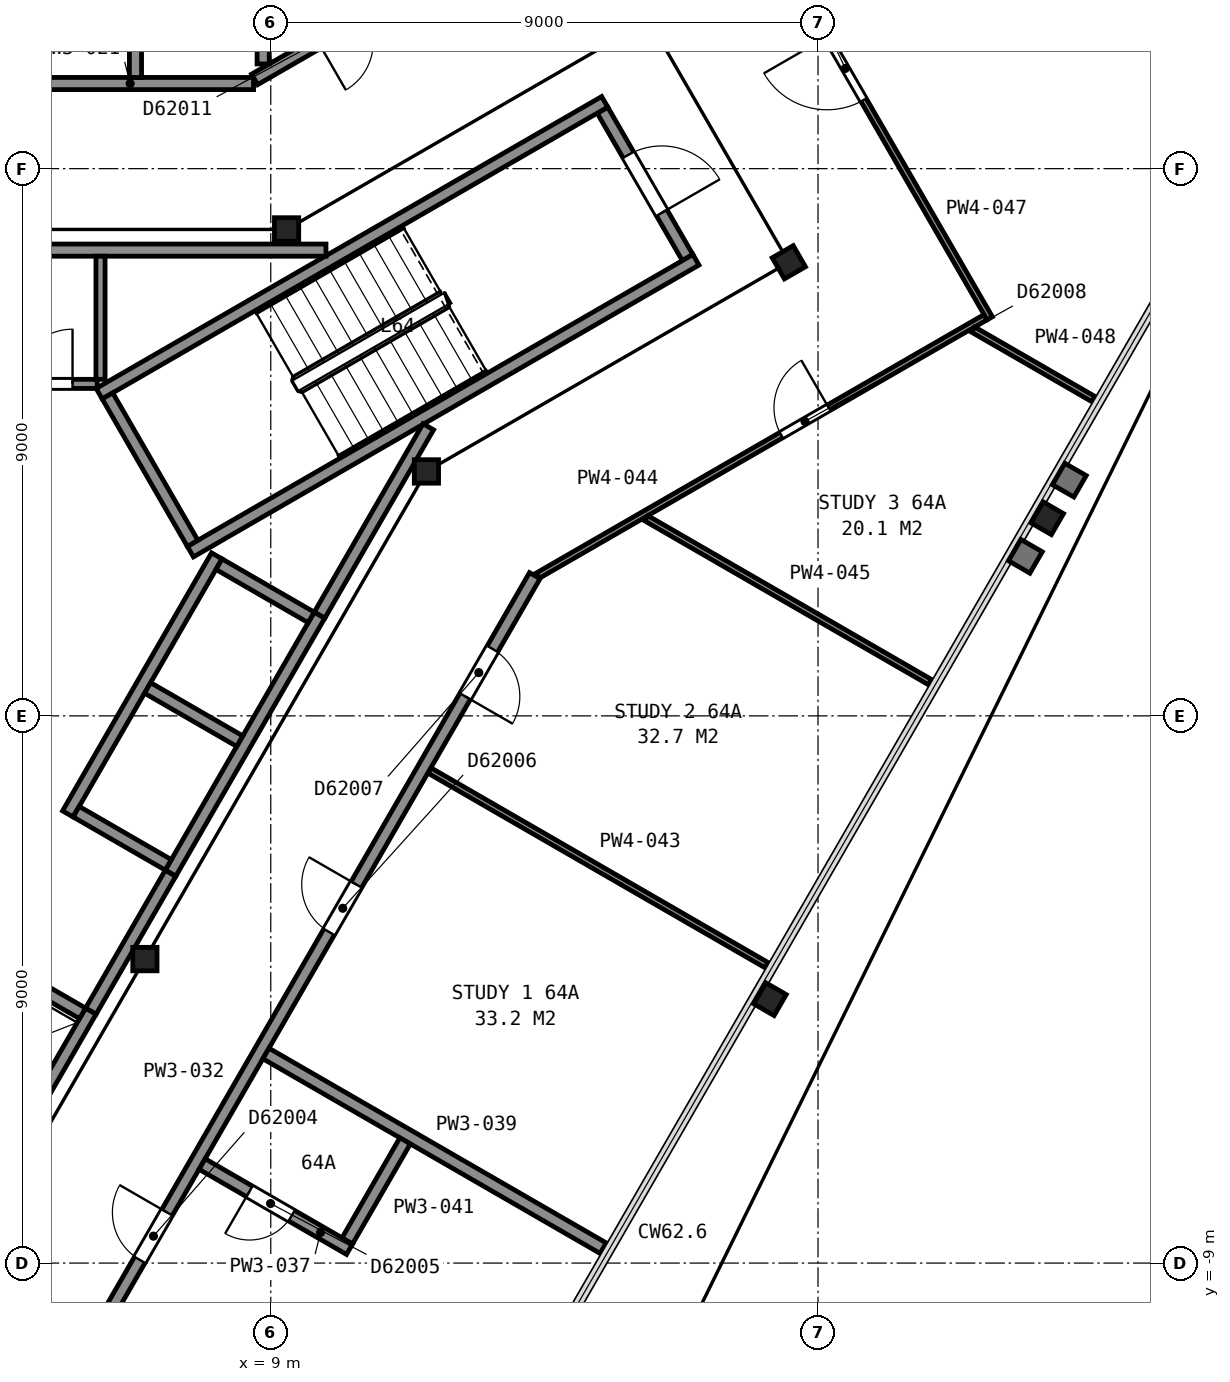
"""IFC4 building model, lengths in metres.
Left out: names, types, materials, properties, quantities, classifications, styles, units other than length and angle.
Written with IfcOpenShell. Run it as: python <this file> out.ifc"""

import sys

from ifc_helpers import new_model, si_unit, direction, frame, frame_2d, origin, origin_2d, place, context, subcontext, project, spatial, rectangle, i_section, extrude, element, fill, save


model = new_model("IFC4")
c1 = context("Model", 3, precision=1e-05, world=origin(), true_north=direction((0.0, 1.0)))
c2 = subcontext(c1, "Body", "Model", "MODEL_VIEW")
j1 = project(units=[si_unit("LENGTHUNIT", "METRE"), si_unit("PLANEANGLEUNIT", "RADIAN")], contexts=[c1])
p1 = place(None, origin())
s1 = spatial("IfcSite", under=j1, at=p1, CompositionType="ELEMENT")
p2 = place(p1, origin())
s2 = spatial("IfcBuilding", under=s1, at=p2, CompositionType="ELEMENT")
p3 = place(p2, frame((0.0, 0.0, 254.5)))
s3 = spatial("IfcBuildingStorey", under=s2, at=p3, CompositionType="ELEMENT", Elevation=254.5)
for number, where, z_axis, x_axis in (
    (1, (17.21, -4.66, 0.0), (0.0, 0.0, 1.0), (-0.5, -0.866, 0.0)),
    (2, (21.77, 3.25, 0.0), (0.0, 0.0, 1.0), (-0.5, -0.866, 0.0)),
):
    element("IfcColumn", number, at=place(p3, frame(where, z_axis=z_axis, x_axis=x_axis)), inside=s3, PredefinedType="COLUMN", context=c2, shape_type="SweptSolid", body=[
        extrude(i_section(OverallWidth=0.399, OverallDepth=0.386, WebThickness=0.021, FlangeThickness=0.033, FilletRadius=0.015, at=origin_2d()), origin(), (0.0, 0.0, 1.0), 3.01),
    ])
p4 = place(p3, frame((11.56, 4.02, 0.0), z_axis=(0.0, 0.0, 1.0), x_axis=(1.0, 0.0, 0.0)))
e3 = element("IfcColumn", 3, at=p4, inside=s3, PredefinedType="COLUMN", context=c2, shape_type="SweptSolid", body=[
    extrude(i_section(OverallWidth=0.399, OverallDepth=0.386, WebThickness=0.021, FlangeThickness=0.033, FilletRadius=0.015, at=origin_2d()), origin(), (0.0, 0.0, 1.0), 3.635),
])
p5 = place(p3, frame((17.52, 7.46, 0.0), z_axis=(0.0, 0.0, 1.0), x_axis=(0.5, -0.866025403784, 0.0)))
e4 = element("IfcColumn", 4, at=p5, inside=s3, PredefinedType="COLUMN", context=c2, shape_type="SweptSolid", body=[
    extrude(i_section(OverallWidth=0.401, OverallDepth=0.399, WebThickness=0.025, FlangeThickness=0.04, FilletRadius=0.015, at=origin_2d()), origin(), (0.0, 0.0, 1.0), 3.65),
])
p6 = place(p3, frame((9.26, 8.0, 0.0), z_axis=(0.0, 0.0, 1.0), x_axis=(1.0, 0.0, 0.0)))
e5 = element("IfcColumn", 5, at=p6, inside=s3, PredefinedType="COLUMN", context=c2, shape_type="SweptSolid", body=[
    extrude(i_section(OverallWidth=0.399, OverallDepth=0.386, WebThickness=0.021, FlangeThickness=0.033, FilletRadius=0.015, at=origin_2d()), origin(), (0.0, 0.0, 1.0), 3.635),
])
p7 = place(p3, frame((6.93, -4.0, 0.0), z_axis=(0.0, 0.0, 1.0), x_axis=(1.0, 0.0, 0.0)))
e6 = element("IfcColumn", 6, at=p7, inside=s3, PredefinedType="COLUMN", context=c2, shape_type="SweptSolid", body=[
    extrude(i_section(OverallWidth=0.399, OverallDepth=0.386, WebThickness=0.021, FlangeThickness=0.033, FilletRadius=0.015, at=origin_2d()), origin(), (0.0, 0.0, 1.0), 3.66),
])
p8 = place(p3, frame((15.855, 7.538, 0.0), z_axis=(0.0, 0.0, 1.0), x_axis=(-0.500049511043, 0.865996816683, 0.0)))
e7 = element("IfcWall", 7, at=p8, inside=s3, PredefinedType="PARTITIONING", context=c2, shape_type="SweptSolid", body=[
    extrude(rectangle(XDim=2.8, YDim=0.2, at=frame_2d((1.4, 0.0))), origin(), (0.0, 0.0, 1.0), 3.45),
])
p9 = place(p8, frame((0.85, 0.0, 0.0)))
e8 = element("IfcOpeningElement", 8, at=p9, cuts=e7, PredefinedType="OPENING", context=c2, shape_type="SweptSolid", body=[
    extrude(rectangle(XDim=1.1, YDim=2.1, at=frame_2d((0.55, 1.05))), frame((0.0, 0.11, 0.0), z_axis=(0.0, -1.0, 0.0), x_axis=(1.0, 0.0, 0.0)), (0.0, 0.0, 1.0), 0.22),
])
for number, where, z_axis, x_axis in (
    (9, (6.178, 5.299, 0.0), (0.0, 0.0, 1.0), (0.866, 0.5, 0.0)),
    (10, (7.678, 2.701, 0.0), (0.0, 0.0, 1.0), (0.866, 0.5, 0.0)),
):
    element("IfcWall", number, at=place(p3, frame(where, z_axis=z_axis, x_axis=x_axis)), inside=s3, PredefinedType="PARTITIONING", context=c2, shape_type="SweptSolid", body=[
        extrude(rectangle(XDim=9.6, YDim=0.2, at=frame_2d((4.8, 0.0))), origin(), (0.0, 0.0, 1.0), 3.45),
    ])
p10 = place(p3, frame((7.715, 2.838, 0.0), z_axis=(0.0, 0.0, 1.0), x_axis=(-0.500049511043, 0.865996816683, 0.0)))
e11 = element("IfcWall", 11, at=p10, inside=s3, PredefinedType="PARTITIONING", context=c2, shape_type="SweptSolid", body=[
    extrude(rectangle(XDim=2.8, YDim=0.2, at=frame_2d((1.4, 0.0))), origin(), (0.0, 0.0, 1.0), 3.45),
])
p11 = place(p3, frame((4.766, -7.065, 0.0), z_axis=(0.0, 0.0, 1.0), x_axis=(0.499948979701, 0.866054858364, 0.0)))
e12 = element("IfcWall", 12, at=p11, inside=s3, PredefinedType="PARTITIONING", context=c2, shape_type="SweptSolid", body=[
    extrude(rectangle(XDim=2.55, YDim=0.2, at=frame_2d((1.275, 0.0))), origin(), (0.0, 0.0, 1.0), 3.7),
])
p12 = place(p3, frame((7.351, -2.587, 0.0), z_axis=(0.0, 0.0, 1.0), x_axis=(0.500002801628, 0.866023786258, 0.0)))
e13 = element("IfcWall", 13, at=p12, inside=s3, PredefinedType="PARTITIONING", context=c2, shape_type="SweptSolid", body=[
    extrude(rectangle(XDim=4.9, YDim=0.2, at=frame_2d((2.45, 0.0))), origin(), (0.0, 0.0, 1.0), 3.7),
])
p13 = place(p3, frame((5.663, -1.612, 0.0), z_axis=(0.0, 0.0, 1.0), x_axis=(0.49998122708, 0.866036242063, 0.0)))
e14 = element("IfcWall", 14, at=p13, inside=s3, PredefinedType="PARTITIONING", context=c2, shape_type="SweptSolid", body=[
    extrude(rectangle(XDim=4.9, YDim=0.2, at=frame_2d((2.45, 0.0))), origin(), (0.0, 0.0, 1.0), 3.7),
])
p14 = place(p3, frame((9.665, 1.62, 0.0), z_axis=(0.0, 0.0, 1.0), x_axis=(-0.866002029911, 0.500040482552, 0.0)))
e15 = element("IfcWall", 15, at=p14, inside=s3, PredefinedType="PARTITIONING", context=c2, shape_type="SweptSolid", body=[
    extrude(rectangle(XDim=1.75, YDim=0.2, at=frame_2d((0.875, 0.0))), origin(), (0.0, 0.0, 1.0), 3.7),
])
for number, where, z_axis, x_axis in (
    (16, (8.49, -0.416, 0.0), (0.0, 0.0, 1.0), (-0.866, 0.5, 0.0)),
    (17, (7.315, -2.451, 0.0), (0.0, 0.0, 1.0), (-0.866, 0.5, 0.0)),
):
    element("IfcWall", number, at=place(p3, frame(where, z_axis=z_axis, x_axis=x_axis)), inside=s3, PredefinedType="PARTITIONING", context=c2, shape_type="SweptSolid", body=[
        extrude(rectangle(XDim=1.75, YDim=0.2, at=frame_2d((0.875, 0.0))), origin(), (0.0, 0.0, 1.0), 3.7),
    ])
p15 = place(p3, frame((5.905, -4.893, 0.0), z_axis=(0.0, 0.0, 1.0), x_axis=(-0.866002029911, 0.500040482552, 0.0)))
e18 = element("IfcWall", 18, at=p15, inside=s3, PredefinedType="PARTITIONING", context=c2, shape_type="SweptSolid", body=[
    extrude(rectangle(XDim=1.75, YDim=0.2, at=frame_2d((0.875, 0.0))), origin(), (0.0, 0.0, 1.0), 3.7),
])
p16 = place(p3, frame((-3.933, 7.66, 0.0), z_axis=(0.0, 0.0, 1.0), x_axis=(1.0, 0.0, 0.0)))
e19 = element("IfcWall", 19, at=p16, inside=s3, PredefinedType="PARTITIONING", context=c2, shape_type="SweptSolid", body=[
    extrude(rectangle(XDim=13.841, YDim=0.2, at=frame_2d((6.92, 0.0))), origin(), (0.0, 0.0, 1.0), 3.45),
])
p17 = place(p3, frame((0.925, 5.46, 0.0), z_axis=(0.0, 0.0, 1.0), x_axis=(1.0, 0.0, 0.0)))
e20 = element("IfcWall", 20, at=p17, inside=s3, PredefinedType="PARTITIONING", context=c2, shape_type="SweptSolid", body=[
    extrude(rectangle(XDim=5.22, YDim=0.15, at=frame_2d((2.61, 0.0))), origin(), (0.0, 0.0, 1.0), 3.45),
])
p18 = place(p17, frame((3.915, 0.0, 0.0)))
e21 = element("IfcOpeningElement", 21, at=p18, cuts=e20, PredefinedType="OPENING", context=c2, shape_type="SweptSolid", body=[
    extrude(rectangle(XDim=0.9, YDim=2.1, at=frame_2d((0.45, 1.05))), frame((0.0, 0.085, 0.0), z_axis=(0.0, -1.0, 0.0), x_axis=(1.0, 0.0, 0.0)), (0.0, 0.0, 1.0), 0.17),
])
p19 = place(p3, frame((6.042, -4.855, 0.0), z_axis=(0.0, 0.0, 1.0), x_axis=(0.500252727967, 0.865879442048, 0.0)))
e22 = element("IfcWall", 22, at=p19, inside=s3, PredefinedType="PARTITIONING", context=c2, shape_type="SweptSolid", body=[
    extrude(rectangle(XDim=2.617, YDim=0.2, at=frame_2d((1.309, 0.0))), origin(), (0.0, 0.0, 1.0), 3.45),
])
p20 = place(p3, frame((6.2, 5.535, 0.0), z_axis=(0.0, 0.0, 1.0), x_axis=(0.0, 1.0, 0.0)))
e23 = element("IfcWall", 23, at=p20, inside=s3, PredefinedType="PARTITIONING", context=c2, shape_type="SweptSolid", body=[
    extrude(rectangle(XDim=2.025, YDim=0.15, at=frame_2d((1.013, 0.0))), origin(), (0.0, 0.0, 1.0), 3.45),
])
p21 = place(p3, frame((9.803, 1.658, 0.0), z_axis=(0.0, 0.0, 1.0), x_axis=(0.499943114462, 0.866058244174, 0.0)))
e24 = element("IfcWall", 24, at=p21, inside=s3, PredefinedType="PARTITIONING", context=c2, shape_type="SweptSolid", body=[
    extrude(rectangle(XDim=3.576, YDim=0.2, at=frame_2d((1.788, 0.0))), origin(), (0.0, 0.0, 1.0), 3.45),
])
p22 = place(p3, frame((-8.667, 10.4, 0.0), z_axis=(0.0, 0.0, 1.0), x_axis=(1.0, 0.0, 0.0)))
e25 = element("IfcWall", 25, at=p22, inside=s3, PredefinedType="PARTITIONING", context=c2, shape_type="SweptSolid", body=[
    extrude(rectangle(XDim=17.384, YDim=0.2, at=frame_2d((8.692, 0.0))), origin(), (0.0, 0.0, 1.0), 2.362),
])
p23 = place(p22, frame((12.425, 0.0, 0.0)))
e26 = element("IfcOpeningElement", 26, at=p23, cuts=e25, PredefinedType="OPENING", context=c2, shape_type="SweptSolid", body=[
    extrude(rectangle(XDim=0.9, YDim=2.1, at=frame_2d((0.45, 1.05))), frame((0.0, 0.11, 0.0), z_axis=(0.0, -1.0, 0.0), x_axis=(1.0, 0.0, 0.0)), (0.0, 0.0, 1.0), 0.22),
])
p24 = place(p22, frame((7.716, 0.0, 0.0)))
e27 = element("IfcOpeningElement", 27, at=p24, cuts=e25, PredefinedType="OPENING", context=c2, shape_type="SweptSolid", body=[
    extrude(rectangle(XDim=0.9, YDim=2.1, at=frame_2d((0.45, 1.05))), frame((0.0, 0.11, 0.0), z_axis=(0.0, -1.0, 0.0), x_axis=(1.0, 0.0, 0.0)), (0.0, 0.0, 1.0), 0.22),
])
p25 = place(p22, frame((3.358, 0.0, 0.0)))
e28 = element("IfcOpeningElement", 28, at=p25, cuts=e25, PredefinedType="OPENING", context=c2, shape_type="SweptSolid", body=[
    extrude(rectangle(XDim=0.9, YDim=2.1, at=frame_2d((0.45, 1.05))), frame((0.0, 0.11, 0.0), z_axis=(0.0, -1.0, 0.0), x_axis=(1.0, 0.0, 0.0)), (0.0, 0.0, 1.0), 0.22),
])
p26 = place(p3, frame((13.342, 2.306, 0.0), z_axis=(0.0, 0.0, 1.0), x_axis=(-0.499983003136, -0.866035216706, 0.0)))
e29 = element("IfcWall", 29, at=p26, inside=s3, PredefinedType="PARTITIONING", context=c2, shape_type="SweptSolid", body=[
    extrude(rectangle(XDim=17.385, YDim=0.2, at=frame_2d((8.692, 0.0))), origin(), (0.0, 0.0, 1.0), 2.362),
])
p27 = place(p26, frame((15.185, 0.0, 0.0)))
e30 = element("IfcOpeningElement", 30, at=p27, cuts=e29, PredefinedType="OPENING", context=c2, shape_type="SweptSolid", body=[
    extrude(rectangle(XDim=0.9, YDim=2.1, at=frame_2d((0.45, 1.05))), frame((0.0, 0.11, 0.0), z_axis=(0.0, -1.0, 0.0), x_axis=(1.0, 0.0, 0.0)), (0.0, 0.0, 1.0), 0.22),
])
p28 = place(p26, frame((12.094, 0.0, 0.0)))
e31 = element("IfcOpeningElement", 31, at=p28, cuts=e29, PredefinedType="OPENING", context=c2, shape_type="SweptSolid", body=[
    extrude(rectangle(XDim=0.9, YDim=2.1, at=frame_2d((0.45, 1.05))), frame((0.0, 0.11, 0.0), z_axis=(0.0, -1.0, 0.0), x_axis=(1.0, 0.0, 0.0)), (0.0, 0.0, 1.0), 0.22),
])
p29 = place(p26, frame((5.867, 0.0, 0.0)))
e32 = element("IfcOpeningElement", 32, at=p29, cuts=e29, PredefinedType="OPENING", context=c2, shape_type="SweptSolid", body=[
    extrude(rectangle(XDim=0.9, YDim=2.1, at=frame_2d((0.45, 1.05))), frame((0.0, 0.11, 0.0), z_axis=(0.0, -1.0, 0.0), x_axis=(1.0, 0.0, 0.0)), (0.0, 0.0, 1.0), 0.22),
])
p30 = place(p26, frame((1.392, 0.0, 0.0)))
e33 = element("IfcOpeningElement", 33, at=p30, cuts=e29, PredefinedType="OPENING", context=c2, shape_type="SweptSolid", body=[
    extrude(rectangle(XDim=0.9, YDim=2.1, at=frame_2d((0.45, 1.05))), frame((0.0, 0.11, 0.0), z_axis=(0.0, -1.0, 0.0), x_axis=(1.0, 0.0, 0.0)), (0.0, 0.0, 1.0), 0.22),
])
p31 = place(p3, frame((6.775, 10.5, 0.0), z_axis=(0.0, 0.0, 1.0), x_axis=(0.0, 1.0, 0.0)))
e34 = element("IfcWall", 34, at=p31, inside=s3, PredefinedType="PARTITIONING", context=c2, shape_type="SweptSolid", body=[
    extrude(rectangle(XDim=6.406, YDim=0.2, at=frame_2d((3.203, 0.0))), origin(), (0.0, 0.0, 1.0), 2.362),
])
p32 = place(p3, frame((7.871, -7.371, 0.0), z_axis=(0.0, 0.0, 1.0), x_axis=(0.866056369097, -0.49994636267, 0.0)))
e35 = element("IfcWall", 35, at=p32, inside=s3, PredefinedType="PARTITIONING", context=c2, shape_type="SweptSolid", body=[
    extrude(rectangle(XDim=2.8, YDim=0.2, at=frame_2d((1.4, 0.0))), origin(), (0.0, 0.0, 1.0), 2.362),
])
p33 = place(p32, frame((0.9, 0.0, 0.0)))
e36 = element("IfcOpeningElement", 36, at=p33, cuts=e35, PredefinedType="OPENING", context=c2, shape_type="SweptSolid", body=[
    extrude(rectangle(XDim=0.8, YDim=2.1, at=frame_2d((0.4, 1.05))), frame((0.0, 0.11, 0.0), z_axis=(0.0, -1.0, 0.0), x_axis=(1.0, 0.0, 0.0)), (0.0, 0.0, 1.0), 0.22),
])
p34 = place(p3, frame((8.734, 10.468, 0.0), z_axis=(0.0, 0.0, 1.0), x_axis=(0.86608074249, 0.499904138298, 0.0)))
e37 = element("IfcWall", 37, at=p34, inside=s3, PredefinedType="PARTITIONING", context=c2, shape_type="SweptSolid", body=[
    extrude(rectangle(XDim=8.453, YDim=0.2, at=frame_2d((4.227, 0.0))), origin(), (0.0, 0.0, 1.0), 2.362),
])
p35 = place(p34, frame((5.209, 0.0, 0.0)))
e38 = element("IfcOpeningElement", 38, at=p35, cuts=e37, PredefinedType="OPENING", context=c2, shape_type="SweptSolid", body=[
    extrude(rectangle(XDim=0.9, YDim=2.1, at=frame_2d((0.45, 1.05))), frame((0.0, 0.11, 0.0), z_axis=(0.0, -1.0, 0.0), x_axis=(1.0, 0.0, 0.0)), (0.0, 0.0, 1.0), 0.22),
])
p36 = place(p34, frame((1.213, 0.0, 0.0)))
e39 = element("IfcOpeningElement", 39, at=p36, cuts=e37, PredefinedType="OPENING", context=c2, shape_type="SweptSolid", body=[
    extrude(rectangle(XDim=0.9, YDim=2.1, at=frame_2d((0.45, 1.05))), frame((0.0, 0.11, 0.0), z_axis=(0.0, -1.0, 0.0), x_axis=(1.0, 0.0, 0.0)), (0.0, 0.0, 1.0), 0.22),
])
p37 = place(p3, frame((8.921, -5.553, 0.0), z_axis=(0.0, 0.0, 1.0), x_axis=(0.866026868306, -0.499997463366, 0.0)))
e40 = element("IfcWall", 40, at=p37, inside=s3, PredefinedType="PARTITIONING", context=c2, shape_type="SweptSolid", body=[
    extrude(rectangle(XDim=6.404, YDim=0.2, at=frame_2d((3.202, 0.0))), origin(), (0.0, 0.0, 1.0), 2.362),
])
p38 = place(p3, frame((8.875, 10.722, 0.0), z_axis=(0.0, 0.0, 1.0), x_axis=(0.0, 1.0, 0.0)))
e41 = element("IfcWall", 41, at=p38, inside=s3, PredefinedType="PARTITIONING", context=c2, shape_type="SweptSolid", body=[
    extrude(rectangle(XDim=3.16, YDim=0.2, at=frame_2d((1.58, 0.0))), origin(), (0.0, 0.0, 1.0), 2.362),
])
p39 = place(p3, frame((10.259, -8.635, 0.0), z_axis=(0.0, 0.0, 1.0), x_axis=(0.500078449558, 0.865980106173, 0.0)))
e42 = element("IfcWall", 42, at=p39, inside=s3, PredefinedType="PARTITIONING", context=c2, shape_type="SweptSolid", body=[
    extrude(rectangle(XDim=1.9, YDim=0.2, at=frame_2d((0.95, 0.0))), origin(), (0.0, 0.0, 1.0), 2.362),
])
p40 = place(p3, frame((11.612, -0.899, 0.0), z_axis=(0.0, 0.0, 1.0), x_axis=(0.865966403178, -0.500102178127, 0.0)))
e43 = element("IfcWall", 43, at=p40, inside=s3, PredefinedType="PARTITIONING", context=c2, shape_type="SweptSolid", body=[
    extrude(rectangle(XDim=6.4, YDim=0.1, at=frame_2d((3.2, 0.0))), origin(), (0.0, 0.0, 1.0), 2.362),
])
p41 = place(p3, frame((20.756, 6.557, 0.0), z_axis=(0.0, 0.0, 1.0), x_axis=(-0.86606177021, -0.499937006213, 0.0)))
e44 = element("IfcWall", 44, at=p41, inside=s3, PredefinedType="PARTITIONING", context=c2, shape_type="SweptSolid", body=[
    extrude(rectangle(XDim=8.504, YDim=0.1, at=frame_2d((4.252, 0.0))), origin(), (0.0, 0.0, 1.0), 2.362),
])
p42 = place(p41, frame((2.979, 0.0, 0.0)))
e45 = element("IfcOpeningElement", 45, at=p42, cuts=e44, PredefinedType="OPENING", context=c2, shape_type="SweptSolid", body=[
    extrude(rectangle(XDim=0.9, YDim=2.1, at=frame_2d((0.45, 1.05))), frame((0.0, 0.06, 0.0), z_axis=(0.0, -1.0, 0.0), x_axis=(1.0, 0.0, 0.0)), (0.0, 0.0, 1.0), 0.12),
])
p43 = place(p3, frame((15.176, 3.25, 0.0), z_axis=(0.0, 0.0, 1.0), x_axis=(0.865941828667, -0.500144728419, 0.0)))
e46 = element("IfcWall", 46, at=p43, inside=s3, PredefinedType="PARTITIONING", context=c2, shape_type="SweptSolid", body=[
    extrude(rectangle(XDim=5.388, YDim=0.1, at=frame_2d((2.694, 0.0))), origin(), (0.0, 0.0, 1.0), 2.362),
])
p44 = place(p3, frame((16.098, 14.718, 0.0), z_axis=(0.0, 0.0, 1.0), x_axis=(0.50030257167, -0.86585064346, 0.0)))
e47 = element("IfcWall", 47, at=p44, inside=s3, PredefinedType="PARTITIONING", context=c2, shape_type="SweptSolid", body=[
    extrude(rectangle(XDim=9.447, YDim=0.1, at=frame_2d((4.723, 0.0))), origin(), (0.0, 0.0, 1.0), 2.362),
])
p45 = place(p44, frame((4.1, 0.0, 0.0)))
e48 = element("IfcOpeningElement", 48, at=p45, cuts=e47, PredefinedType="OPENING", context=c2, shape_type="SweptSolid", body=[
    extrude(rectangle(XDim=1.2, YDim=2.1, at=frame_2d((0.6, 1.05))), frame((0.0, 0.06, 0.0), z_axis=(0.0, -1.0, 0.0), x_axis=(1.0, 0.0, 0.0)), (0.0, 0.0, 1.0), 0.12),
])
p46 = place(p3, frame((20.552, 6.353, 0.0), z_axis=(0.0, 0.0, 1.0), x_axis=(0.865865073245, -0.500277597875, 0.0)))
e49 = element("IfcWall", 49, at=p46, inside=s3, PredefinedType="PARTITIONING", context=c2, shape_type="SweptSolid", body=[
    extrude(rectangle(XDim=2.284, YDim=0.1, at=frame_2d((1.142, 0.0))), origin(), (0.0, 0.0, 1.0), 2.362),
])
p47 = place(p9, origin())
e50 = element("IfcDoor", 50, at=p47, inside=s3, OperationType="SINGLE_SWING_LEFT", PredefinedType="DOOR", context=c2, shape_type="SweptSolid", body=[
    extrude(rectangle(XDim=1.1, YDim=2.1, at=frame_2d((0.55, 1.05))), frame((0.0, 0.025, 0.0), z_axis=(0.0, -1.0, 0.0), x_axis=(1.0, 0.0, 0.0)), (0.0, 0.0, 1.0), 0.05),
])
fill(e8, e50)
p48 = place(p18, origin())
e51 = element("IfcDoor", 51, at=p48, inside=s3, OperationType="SINGLE_SWING_RIGHT", PredefinedType="DOOR", context=c2, shape_type="SweptSolid", body=[
    extrude(rectangle(XDim=0.9, YDim=2.1, at=frame_2d((0.45, 1.05))), frame((0.0, 0.025, 0.0), z_axis=(0.0, -1.0, 0.0), x_axis=(1.0, 0.0, 0.0)), (0.0, 0.0, 1.0), 0.05),
])
fill(e21, e51)
p49 = place(p28, origin())
e52 = element("IfcDoor", 52, at=p49, inside=s3, OperationType="SINGLE_SWING_LEFT", PredefinedType="DOOR", context=c2, shape_type="SweptSolid", body=[
    extrude(rectangle(XDim=0.9, YDim=2.1, at=frame_2d((0.45, 1.05))), frame((0.0, 0.025, 0.0), z_axis=(0.0, -1.0, 0.0), x_axis=(1.0, 0.0, 0.0)), (0.0, 0.0, 1.0), 0.05),
])
fill(e31, e52)
p50 = place(p29, origin())
e53 = element("IfcDoor", 53, at=p50, inside=s3, OperationType="SINGLE_SWING_LEFT", PredefinedType="DOOR", context=c2, shape_type="SweptSolid", body=[
    extrude(rectangle(XDim=0.9, YDim=2.1, at=frame_2d((0.45, 1.05))), frame((0.0, 0.025, 0.0), z_axis=(0.0, -1.0, 0.0), x_axis=(1.0, 0.0, 0.0)), (0.0, 0.0, 1.0), 0.05),
])
fill(e32, e53)
p51 = place(p30, origin())
e54 = element("IfcDoor", 54, at=p51, inside=s3, OperationType="SINGLE_SWING_RIGHT", PredefinedType="DOOR", context=c2, shape_type="SweptSolid", body=[
    extrude(rectangle(XDim=0.9, YDim=2.1, at=frame_2d((0.45, 1.05))), frame((0.0, 0.025, 0.0), z_axis=(0.0, -1.0, 0.0), x_axis=(1.0, 0.0, 0.0)), (0.0, 0.0, 1.0), 0.05),
])
fill(e33, e54)
p52 = place(p33, origin())
e55 = element("IfcDoor", 55, at=p52, inside=s3, OperationType="SINGLE_SWING_LEFT", PredefinedType="DOOR", context=c2, shape_type="SweptSolid", body=[
    extrude(rectangle(XDim=0.8, YDim=2.1, at=frame_2d((0.4, 1.05))), frame((0.0, 0.025, 0.0), z_axis=(0.0, -1.0, 0.0), x_axis=(1.0, 0.0, 0.0)), (0.0, 0.0, 1.0), 0.05),
])
fill(e36, e55)
p53 = place(p42, origin())
e56 = element("IfcDoor", 56, at=p53, inside=s3, OperationType="SINGLE_SWING_LEFT", PredefinedType="DOOR", context=c2, shape_type="SweptSolid", body=[
    extrude(rectangle(XDim=0.9, YDim=2.1, at=frame_2d((0.45, 1.05))), frame((0.0, 0.025, 0.0), z_axis=(0.0, -1.0, 0.0), x_axis=(1.0, 0.0, 0.0)), (0.0, 0.0, 1.0), 0.05),
])
fill(e45, e56)
p54 = place(p45, origin())
e57 = element("IfcDoor", 57, at=p54, inside=s3, OperationType="SINGLE_SWING_LEFT", PredefinedType="DOOR", context=c2, shape_type="SweptSolid", body=[
    extrude(rectangle(XDim=1.2, YDim=2.1, at=frame_2d((0.6, 1.05))), frame((0.0, 0.025, 0.0), z_axis=(0.0, -1.0, 0.0), x_axis=(1.0, 0.0, 0.0)), (0.0, 0.0, 1.0), 0.05),
])
fill(e48, e57)
save(model, sys.argv[1])
